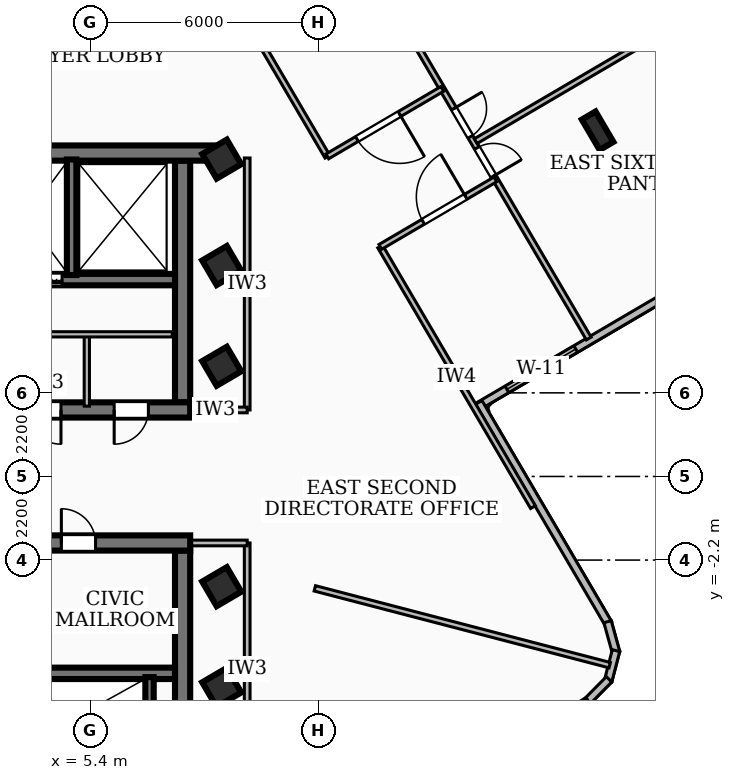
"""IFC4 building model, lengths in metres.
Left out: names, types, materials, properties, quantities, classifications, styles, units other than length and angle.
Written with IfcOpenShell. Run it as: python <this file> out.ifc"""

import sys

from ifc_helpers import new_model, si_unit, direction, frame, frame_2d, origin, origin_2d, place, context, subcontext, project, spatial, rectangle, i_section, extrude, element, fill, save


model = new_model("IFC4")
c1 = context("Model", 3, precision=1e-05, world=origin(), true_north=direction((0.0, 1.0)))
c2 = subcontext(c1, "Body", "Model", "MODEL_VIEW")
j1 = project(units=[si_unit("LENGTHUNIT", "METRE"), si_unit("PLANEANGLEUNIT", "RADIAN")], contexts=[c1])
p1 = place(None, origin())
s1 = spatial("IfcSite", under=j1, at=p1, CompositionType="ELEMENT")
p2 = place(p1, origin())
s2 = spatial("IfcBuilding", under=s1, at=p2, CompositionType="ELEMENT")
p3 = place(p2, frame((0.0, 0.0, 212.04)))
s3 = spatial("IfcBuildingStorey", under=s2, at=p3, CompositionType="ELEMENT", Elevation=212.04)
p4 = place(p3, frame((-8.78, 8.51, 0.0), z_axis=(0.0, 0.0, 1.0), x_axis=(1.0, 0.0, 0.0)))
e1 = element("IfcWall", 1, at=p4, inside=s3, PredefinedType="SHEAR", context=c2, shape_type="SweptSolid", body=[
    extrude(rectangle(XDim=17.56, YDim=0.4, at=frame_2d((8.78, 0.0))), origin(), (0.0, 0.0, 1.0), 3.16),
])
p5 = place(p3, frame((8.02, 1.75, 0.0), z_axis=(0.0, 0.0, 1.0), x_axis=(-1.0, 0.0, 0.0)))
e2 = element("IfcWall", 2, at=p5, inside=s3, PredefinedType="SHEAR", context=c2, shape_type="SweptSolid", body=[
    extrude(rectangle(XDim=16.04, YDim=0.4, at=frame_2d((8.02, 0.0))), origin(), (0.0, 0.0, 1.0), 3.16),
])
p6 = place(p5, frame((7.45, 0.0, 0.0)))
e3 = element("IfcOpeningElement", 3, at=p6, cuts=e2, PredefinedType="OPENING", context=c2, shape_type="SweptSolid", body=[
    extrude(rectangle(XDim=1.0, YDim=2.1, at=frame_2d((0.5, 1.05))), frame((0.0, 0.21, 0.0), z_axis=(0.0, -1.0, 0.0), x_axis=(1.0, 0.0, 0.0)), (0.0, 0.0, 1.0), 0.42),
])
p7 = place(p5, frame((14.285, 0.0, 0.0)))
e4 = element("IfcOpeningElement", 4, at=p7, cuts=e2, PredefinedType="OPENING", context=c2, shape_type="SweptSolid", body=[
    extrude(rectangle(XDim=1.05, YDim=2.15, at=frame_2d((0.525, 1.075))), frame((0.0, 0.21, 0.0), z_axis=(0.0, -1.0, 0.0), x_axis=(1.0, 0.0, 0.0)), (0.0, 0.0, 1.0), 0.42),
])
p8 = place(p5, frame((12.725, 0.0, 0.0)))
e5 = element("IfcOpeningElement", 5, at=p8, cuts=e2, PredefinedType="OPENING", context=c2, shape_type="SweptSolid", body=[
    extrude(rectangle(XDim=1.05, YDim=2.15, at=frame_2d((0.525, 1.075))), frame((0.0, 0.21, 0.0), z_axis=(0.0, -1.0, 0.0), x_axis=(1.0, 0.0, 0.0)), (0.0, 0.0, 1.0), 0.42),
])
p9 = place(p5, frame((11.165, 0.0, 0.0)))
e6 = element("IfcOpeningElement", 6, at=p9, cuts=e2, PredefinedType="OPENING", context=c2, shape_type="SweptSolid", body=[
    extrude(rectangle(XDim=1.05, YDim=2.15, at=frame_2d((0.525, 1.075))), frame((0.0, 0.21, 0.0), z_axis=(0.0, -1.0, 0.0), x_axis=(1.0, 0.0, 0.0)), (0.0, 0.0, 1.0), 0.42),
])
p10 = place(p5, frame((3.4, 0.0, 0.0)))
e7 = element("IfcOpeningElement", 7, at=p10, cuts=e2, PredefinedType="OPENING", context=c2, shape_type="SweptSolid", body=[
    extrude(rectangle(XDim=0.9, YDim=2.06, at=frame_2d((0.45, 1.03))), frame((0.0, 0.21, 0.0), z_axis=(0.0, -1.0, 0.0), x_axis=(1.0, 0.0, 0.0)), (0.0, 0.0, 1.0), 0.42),
])
p11 = place(p5, frame((1.1, 0.0, 0.0)))
e8 = element("IfcOpeningElement", 8, at=p11, cuts=e2, PredefinedType="OPENING", context=c2, shape_type="SweptSolid", body=[
    extrude(rectangle(XDim=0.9, YDim=2.06, at=frame_2d((0.45, 1.03))), frame((0.0, 0.21, 0.0), z_axis=(0.0, -1.0, 0.0), x_axis=(1.0, 0.0, 0.0)), (0.0, 0.0, 1.0), 0.42),
])
p12 = place(p3, frame((7.82, 8.31, 0.0), z_axis=(0.0, 0.0, 1.0), x_axis=(0.0, -1.0, 0.0)))
e9 = element("IfcWall", 9, at=p12, inside=s3, PredefinedType="SHEAR", context=c2, shape_type="SweptSolid", body=[
    extrude(rectangle(XDim=6.36, YDim=0.4, at=frame_2d((3.18, 0.0))), origin(), (0.0, 0.0, 1.0), 3.16),
])
p13 = place(p3, frame((7.62, 5.18, 0.0), z_axis=(0.0, 0.0, 1.0), x_axis=(-1.0, 0.0, 0.0)))
e10 = element("IfcWall", 10, at=p13, inside=s3, PredefinedType="SOLIDWALL", context=c2, shape_type="SweptSolid", body=[
    extrude(rectangle(XDim=15.24, YDim=0.3, at=frame_2d((7.62, 0.0))), origin(), (0.0, 0.0, 1.0), 3.16),
])
p14 = place(p13, frame((5.77, 0.0, 0.0)))
e11 = element("IfcOpeningElement", 11, at=p14, cuts=e10, PredefinedType="OPENING", context=c2, shape_type="SweptSolid", body=[
    extrude(rectangle(XDim=1.1, YDim=2.15, at=frame_2d((0.55, 1.075))), frame((0.0, 0.16, 0.0), z_axis=(0.0, -1.0, 0.0), x_axis=(1.0, 0.0, 0.0)), (0.0, 0.0, 1.0), 0.32),
])
p15 = place(p13, frame((2.97, 0.0, 0.0)))
e12 = element("IfcOpeningElement", 12, at=p15, cuts=e10, PredefinedType="OPENING", context=c2, shape_type="SweptSolid", body=[
    extrude(rectangle(XDim=1.1, YDim=2.15, at=frame_2d((0.55, 1.075))), frame((0.0, 0.16, 0.0), z_axis=(0.0, -1.0, 0.0), x_axis=(1.0, 0.0, 0.0)), (0.0, 0.0, 1.0), 0.32),
])
p16 = place(p13, frame((7.97, 0.0, 0.0)))
e13 = element("IfcOpeningElement", 13, at=p16, cuts=e10, PredefinedType="OPENING", context=c2, shape_type="SweptSolid", body=[
    extrude(rectangle(XDim=1.0, YDim=2.1, at=frame_2d((0.5, 1.05))), frame((0.0, 0.16, 0.0), z_axis=(0.0, -1.0, 0.0), x_axis=(1.0, 0.0, 0.0)), (0.0, 0.0, 1.0), 0.32),
])
p17 = place(p3, frame((-8.02, -1.75, 0.0), z_axis=(0.0, 0.0, 1.0), x_axis=(1.0, 0.0, 0.0)))
e14 = element("IfcWall", 14, at=p17, inside=s3, PredefinedType="SHEAR", context=c2, shape_type="SweptSolid", body=[
    extrude(rectangle(XDim=16.04, YDim=0.4, at=frame_2d((8.02, 0.0))), origin(), (0.0, 0.0, 1.0), 3.16),
])
p18 = place(p17, frame((7.45, 0.0, 0.0)))
e15 = element("IfcOpeningElement", 15, at=p18, cuts=e14, PredefinedType="OPENING", context=c2, shape_type="SweptSolid", body=[
    extrude(rectangle(XDim=1.0, YDim=2.1, at=frame_2d((0.5, 1.05))), frame((0.0, 0.21, 0.0), z_axis=(0.0, -1.0, 0.0), x_axis=(1.0, 0.0, 0.0)), (0.0, 0.0, 1.0), 0.42),
])
p19 = place(p17, frame((12.65, 0.0, 0.0)))
e16 = element("IfcOpeningElement", 16, at=p19, cuts=e14, PredefinedType="OPENING", context=c2, shape_type="SweptSolid", body=[
    extrude(rectangle(XDim=0.9, YDim=2.06, at=frame_2d((0.45, 1.03))), frame((0.0, 0.21, 0.0), z_axis=(0.0, -1.0, 0.0), x_axis=(1.0, 0.0, 0.0)), (0.0, 0.0, 1.0), 0.42),
])
p20 = place(p17, frame((2.25, 0.0, 0.0)))
e17 = element("IfcOpeningElement", 17, at=p20, cuts=e14, PredefinedType="OPENING", context=c2, shape_type="SweptSolid", body=[
    extrude(rectangle(XDim=0.9, YDim=2.06, at=frame_2d((0.45, 1.03))), frame((0.0, 0.21, 0.0), z_axis=(0.0, -1.0, 0.0), x_axis=(1.0, 0.0, 0.0)), (0.0, 0.0, 1.0), 0.42),
])
p21 = place(p3, frame((7.82, -1.95, 0.0), z_axis=(0.0, 0.0, 1.0), x_axis=(0.0, -1.0, 0.0)))
e18 = element("IfcWall", 18, at=p21, inside=s3, PredefinedType="SHEAR", context=c2, shape_type="SweptSolid", body=[
    extrude(rectangle(XDim=6.36, YDim=0.4, at=frame_2d((3.18, 0.0))), origin(), (0.0, 0.0, 1.0), 3.16),
])
p22 = place(p3, frame((-7.62, -5.18, 0.0), z_axis=(0.0, 0.0, 1.0), x_axis=(1.0, 0.0, 0.0)))
e19 = element("IfcWall", 19, at=p22, inside=s3, PredefinedType="SOLIDWALL", context=c2, shape_type="SweptSolid", body=[
    extrude(rectangle(XDim=15.24, YDim=0.3, at=frame_2d((7.62, 0.0))), origin(), (0.0, 0.0, 1.0), 3.16),
])
p23 = place(p22, frame((5.77, 0.0, 0.0)))
e20 = element("IfcOpeningElement", 20, at=p23, cuts=e19, PredefinedType="OPENING", context=c2, shape_type="SweptSolid", body=[
    extrude(rectangle(XDim=1.1, YDim=2.15, at=frame_2d((0.55, 1.075))), frame((0.0, 0.16, 0.0), z_axis=(0.0, -1.0, 0.0), x_axis=(1.0, 0.0, 0.0)), (0.0, 0.0, 1.0), 0.32),
])
p24 = place(p22, frame((7.97, 0.0, 0.0)))
e21 = element("IfcOpeningElement", 21, at=p24, cuts=e19, PredefinedType="OPENING", context=c2, shape_type="SweptSolid", body=[
    extrude(rectangle(XDim=1.0, YDim=2.1, at=frame_2d((0.5, 1.05))), frame((0.0, 0.16, 0.0), z_axis=(0.0, -1.0, 0.0), x_axis=(1.0, 0.0, 0.0)), (0.0, 0.0, 1.0), 0.32),
])
p25 = place(p3, frame((6.95, -8.34, 0.0), z_axis=(0.0, 0.0, 1.0), x_axis=(0.0, 1.0, 0.0)))
e22 = element("IfcWall", 22, at=p25, inside=s3, PredefinedType="SOLIDWALL", context=c2, shape_type="SweptSolid", body=[
    extrude(rectangle(XDim=3.06, YDim=0.22, at=frame_2d((1.53, 0.0))), origin(), (0.0, 0.0, 1.0), 3.16),
])
p26 = place(p3, frame((4.9, 5.3, 0.0), z_axis=(0.0, 0.0, 1.0), x_axis=(0.0, 1.0, 0.0)))
e23 = element("IfcWall", 23, at=p26, inside=s3, PredefinedType="SOLIDWALL", context=c2, shape_type="SweptSolid", body=[
    extrude(rectangle(XDim=3.04, YDim=0.25, at=frame_2d((1.52, 0.0))), origin(), (0.0, 0.0, 1.0), 3.16),
])
for number, where, z_axis, x_axis in (
    (24, (8.85, -5.55, 0.0), (0.0, 0.0, 1.0), (0.863, 0.506, 0.0)),
    (25, (8.85, -2.9, 0.0), (0.0, 0.0, 1.0), (0.863, 0.506, 0.0)),
    (26, (8.85, 2.9, 0.0), (0.0, 0.0, 1.0), (0.863, 0.506, 0.0)),
    (27, (8.85, 5.55, 0.0), (0.0, 0.0, 1.0), (0.863, 0.506, 0.0)),
    (28, (8.85, 8.35, 0.0), (0.0, 0.0, 1.0), (0.863, 0.506, 0.0)),
):
    element("IfcColumn", number, at=place(p3, frame(where, z_axis=z_axis, x_axis=x_axis)), inside=s3, PredefinedType="COLUMN", context=c2, shape_type="SweptSolid", body=[
        extrude(rectangle(XDim=0.75, YDim=0.75, at=origin_2d()), origin(), (0.0, 0.0, 1.0), 3.42),
    ])
p27 = place(p3, frame((18.741, 9.097, 0.0), z_axis=(0.0, 0.0, 1.0), x_axis=(0.862513669207, 0.506033764121, 0.0)))
e29 = element("IfcColumn", 29, at=p27, inside=s3, PredefinedType="COLUMN", context=c2, shape_type="SweptSolid", body=[
    extrude(i_section(OverallWidth=0.418, OverallDepth=0.927, WebThickness=0.019, FlangeThickness=0.032, at=origin_2d()), origin(), (0.0, 0.0, 1.0), 3.42),
])
p28 = place(p3, frame((18.869, 16.65, 0.0), z_axis=(0.0, 0.0, 1.0), x_axis=(0.505984418435, -0.862542618252, 0.0)))
e30 = element("IfcWall", 30, at=p28, inside=s3, PredefinedType="SOLIDWALL", context=c2, shape_type="SweptSolid", body=[
    extrude(rectangle(XDim=9.625, YDim=0.2, at=frame_2d((4.812, 0.0))), origin(), (0.0, 0.0, 1.0), 3.16),
])
p29 = place(p28, frame((6.457, 0.0, 0.85)))
e31 = element("IfcOpeningElement", 31, at=p29, cuts=e30, PredefinedType="OPENING", context=c2, shape_type="SweptSolid", body=[
    extrude(rectangle(XDim=2.1, YDim=1.8, at=frame_2d((1.05, 0.9))), frame((0.0, 0.11, 0.0), z_axis=(0.0, -1.0, 0.0), x_axis=(1.0, 0.0, 0.0)), (0.0, 0.0, 1.0), 0.22),
])
p30 = place(p3, frame((23.209, 6.312, 0.0), z_axis=(0.0, 0.0, 1.0), x_axis=(-0.862602827395, -0.505881766988, 0.0)))
e32 = element("IfcWall", 32, at=p30, inside=s3, PredefinedType="SOLIDWALL", context=c2, shape_type="SweptSolid", body=[
    extrude(rectangle(XDim=8.842, YDim=0.2, at=frame_2d((4.421, 0.0))), origin(), (0.0, 0.0, 1.0), 3.16),
])
p31 = place(p30, frame((5.847, 0.0, 0.85)))
e33 = element("IfcOpeningElement", 33, at=p31, cuts=e32, PredefinedType="OPENING", context=c2, shape_type="SweptSolid", body=[
    extrude(rectangle(XDim=2.1, YDim=1.6, at=frame_2d((1.05, 0.8))), frame((0.0, 0.11, 0.0), z_axis=(0.0, -1.0, 0.0), x_axis=(1.0, 0.0, 0.0)), (0.0, 0.0, 1.0), 0.22),
])
p32 = place(p3, frame((15.611, 1.948, 0.0), z_axis=(0.0, 0.0, 1.0), x_axis=(0.505999167705, -0.862533965872, 0.0)))
e34 = element("IfcWall", 34, at=p32, inside=s3, PredefinedType="SOLIDWALL", context=c2, shape_type="SweptSolid", body=[
    extrude(rectangle(XDim=6.743, YDim=0.2, at=frame_2d((3.372, 0.0))), origin(), (0.0, 0.0, 1.0), 3.16),
])
p33 = place(p3, frame((19.003, -3.822, 0.0), z_axis=(0.0, 0.0, 1.0), x_axis=(0.266246353668, -0.963905015631, 0.0)))
e35 = element("IfcWall", 35, at=p33, inside=s3, PredefinedType="SOLIDWALL", context=c2, shape_type="SweptSolid", body=[
    extrude(rectangle(XDim=0.838, YDim=0.2, at=frame_2d((0.419, 0.0))), origin(), (0.0, 0.0, 1.0), 3.16),
])
p34 = place(p3, frame((19.225, -4.582, 0.0), z_axis=(0.0, 0.0, 1.0), x_axis=(-0.251167733737, -0.967943577658, 0.0)))
e36 = element("IfcWall", 36, at=p34, inside=s3, PredefinedType="SOLIDWALL", context=c2, shape_type="SweptSolid", body=[
    extrude(rectangle(XDim=0.824, YDim=0.2, at=frame_2d((0.412, 0.0))), origin(), (0.0, 0.0, 1.0), 3.16),
])
p35 = place(p3, frame((19.042, -5.338, 0.0), z_axis=(0.0, 0.0, 1.0), x_axis=(-0.702877524881, -0.711310891957, 0.0)))
e37 = element("IfcWall", 37, at=p35, inside=s3, PredefinedType="SOLIDWALL", context=c2, shape_type="SweptSolid", body=[
    extrude(rectangle(XDim=0.84, YDim=0.2, at=frame_2d((0.42, 0.0))), origin(), (0.0, 0.0, 1.0), 3.16),
])
p36 = place(p3, frame((18.492, -5.904, 0.0), z_axis=(0.0, 0.0, 1.0), x_axis=(-0.86245977502, -0.506125613333, 0.0)))
e38 = element("IfcWall", 38, at=p36, inside=s3, PredefinedType="SOLIDWALL", context=c2, shape_type="SweptSolid", body=[
    extrude(rectangle(XDim=6.741, YDim=0.2, at=frame_2d((3.371, 0.0))), origin(), (0.0, 0.0, 1.0), 3.16),
])
p37 = place(p3, frame((2.9, 3.74, 0.0), z_axis=(0.0, 0.0, 1.0), x_axis=(1.0, 0.0, 0.0)))
e39 = element("IfcWall", 39, at=p37, inside=s3, PredefinedType="PARTITIONING", context=c2, shape_type="SweptSolid", body=[
    extrude(rectangle(XDim=4.65, YDim=0.138, at=frame_2d((2.325, 0.0))), origin(), (0.0, 0.0, 1.0), 3.16),
])
p38 = place(p3, frame((5.3, 1.85, 0.0), z_axis=(0.0, 0.0, 1.0), x_axis=(0.0, 1.0, 0.0)))
e40 = element("IfcWall", 40, at=p38, inside=s3, PredefinedType="PARTITIONING", context=c2, shape_type="SweptSolid", body=[
    extrude(rectangle(XDim=1.89, YDim=0.138, at=frame_2d((0.945, 0.0))), origin(), (0.0, 0.0, 1.0), 2.39),
])
p39 = place(p3, frame((9.52, 1.75, 0.0), z_axis=(0.0, 0.0, 1.0), x_axis=(0.0, 1.0, 0.0)))
e41 = element("IfcWall", 41, at=p39, inside=s3, PredefinedType="PARTITIONING", context=c2, shape_type="SweptSolid", body=[
    extrude(rectangle(XDim=6.63, YDim=0.15, at=frame_2d((3.315, 0.0))), origin(), (0.0, 0.0, 1.0), 2.53),
])
p40 = place(p3, frame((7.85, 1.75, 0.0), z_axis=(0.0, 0.0, 1.0), x_axis=(1.0, 0.0, 0.0)))
e42 = element("IfcWall", 42, at=p40, inside=s3, PredefinedType="PARTITIONING", context=c2, shape_type="SweptSolid", body=[
    extrude(rectangle(XDim=1.67, YDim=0.15, at=frame_2d((0.835, 0.0))), origin(), (0.0, 0.0, 1.0), 2.39),
])
p41 = place(p3, frame((9.52, -8.38, 0.0), z_axis=(0.0, 0.0, 1.0), x_axis=(0.0, 1.0, 0.0)))
e43 = element("IfcWall", 43, at=p41, inside=s3, PredefinedType="PARTITIONING", context=c2, shape_type="SweptSolid", body=[
    extrude(rectangle(XDim=6.63, YDim=0.15, at=frame_2d((3.315, 0.0))), origin(), (0.0, 0.0, 1.0), 3.16),
])
p42 = place(p3, frame((7.85, -1.75, 0.0), z_axis=(0.0, 0.0, 1.0), x_axis=(1.0, 0.0, 0.0)))
e44 = element("IfcWall", 44, at=p42, inside=s3, PredefinedType="PARTITIONING", context=c2, shape_type="SweptSolid", body=[
    extrude(rectangle(XDim=1.67, YDim=0.15, at=frame_2d((0.835, 0.0))), origin(), (0.0, 0.0, 1.0), 2.39),
])
p43 = place(p3, frame((11.3, -2.944, 0.0), z_axis=(0.0, 0.0, 1.0), x_axis=(0.967711624716, -0.252059936106, 0.0)))
e45 = element("IfcWall", 45, at=p43, inside=s3, PredefinedType="PARTITIONING", context=c2, shape_type="SweptSolid", body=[
    extrude(rectangle(XDim=8.018, YDim=0.145, at=frame_2d((4.009, 0.0))), origin(), (0.0, 0.0, 1.0), 3.16),
])
p44 = place(p3, frame((11.632, 8.413, 0.0), z_axis=(0.0, 0.0, 1.0), x_axis=(-0.506057561451, 0.862499706955, 0.0)))
e46 = element("IfcWall", 46, at=p44, inside=s3, PredefinedType="PARTITIONING", context=c2, shape_type="SweptSolid", body=[
    extrude(rectangle(XDim=7.95, YDim=0.145, at=frame_2d((3.975, 0.0))), origin(), (0.0, 0.0, 1.0), 2.53),
])
p45 = place(p3, frame((17.041, -0.807, 0.0), z_axis=(0.0, 0.0, 1.0), x_axis=(-0.505943324238, 0.862566723598, 0.0)))
e47 = element("IfcWall", 47, at=p45, inside=s3, PredefinedType="PARTITIONING", context=c2, shape_type="SweptSolid", body=[
    extrude(rectangle(XDim=7.949, YDim=0.145, at=frame_2d((3.975, 0.0))), origin(), (0.0, 0.0, 1.0), 3.16),
])
p46 = place(p3, frame((14.654, 10.198, 0.0), z_axis=(0.0, 0.0, 1.0), x_axis=(-0.862375516706, -0.506269165747, 0.0)))
e48 = element("IfcWall", 48, at=p46, inside=s3, PredefinedType="PARTITIONING", context=c2, shape_type="SweptSolid", body=[
    extrude(rectangle(XDim=3.51, YDim=0.145, at=frame_2d((1.755, 0.0))), origin(), (0.0, 0.0, 1.0), 2.53),
])
p47 = place(p46, frame((1.305, 0.0, 0.0)))
e49 = element("IfcOpeningElement", 49, at=p47, cuts=e48, PredefinedType="OPENING", context=c2, shape_type="SweptSolid", body=[
    extrude(rectangle(XDim=1.3, YDim=2.1, at=frame_2d((0.65, 1.05))), frame((0.0, 0.083, 0.0), z_axis=(0.0, -1.0, 0.0), x_axis=(1.0, 0.0, 0.0)), (0.0, 0.0, 1.0), 0.165),
])
p48 = place(p3, frame((13.024, 6.041, 0.0), z_axis=(0.0, 0.0, 1.0), x_axis=(0.862527334663, 0.506010471195, 0.0)))
e50 = element("IfcWall", 50, at=p48, inside=s3, PredefinedType="PARTITIONING", context=c2, shape_type="SweptSolid", body=[
    extrude(rectangle(XDim=3.51, YDim=0.145, at=frame_2d((1.755, 0.0))), origin(), (0.0, 0.0, 1.0), 3.16),
])
p49 = place(p48, frame((1.305, 0.0, 0.0)))
e51 = element("IfcOpeningElement", 51, at=p49, cuts=e50, PredefinedType="OPENING", context=c2, shape_type="SweptSolid", body=[
    extrude(rectangle(XDim=1.3, YDim=2.1, at=frame_2d((0.65, 1.05))), frame((0.0, 0.083, 0.0), z_axis=(0.0, -1.0, 0.0), x_axis=(1.0, 0.0, 0.0)), (0.0, 0.0, 1.0), 0.165),
])
p50 = place(p3, frame((15.531, 8.822, 0.0), z_axis=(0.0, 0.0, 1.0), x_axis=(0.862494081005, 0.506067149923, 0.0)))
e52 = element("IfcWall", 52, at=p50, inside=s3, PredefinedType="PARTITIONING", context=c2, shape_type="SweptSolid", body=[
    extrude(rectangle(XDim=6.776, YDim=0.145, at=frame_2d((3.388, 0.0))), origin(), (0.0, 0.0, 1.0), 2.53),
])
p51 = place(p3, frame((12.198, 14.385, 0.0), z_axis=(0.0, 0.0, 1.0), x_axis=(0.506037527975, -0.862511460956, 0.0)))
e53 = element("IfcWall", 53, at=p51, inside=s3, PredefinedType="PARTITIONING", context=c2, shape_type="SweptSolid", body=[
    extrude(rectangle(XDim=12.469, YDim=0.145, at=frame_2d((6.235, 0.0))), origin(), (0.0, 0.0, 1.0), 2.53),
])
p52 = place(p51, frame((6.655, 0.0, 0.0)))
e54 = element("IfcOpeningElement", 54, at=p52, cuts=e53, PredefinedType="OPENING", context=c2, shape_type="SweptSolid", body=[
    extrude(rectangle(XDim=0.86, YDim=2.04, at=frame_2d((0.43, 1.02))), frame((0.0, 0.083, 0.0), z_axis=(0.0, -1.0, 0.0), x_axis=(1.0, 0.0, 0.0)), (0.0, 0.0, 1.0), 0.165),
])
p53 = place(p51, frame((5.455, 0.0, 0.0)))
e55 = element("IfcOpeningElement", 55, at=p53, cuts=e53, PredefinedType="OPENING", context=c2, shape_type="SweptSolid", body=[
    extrude(rectangle(XDim=0.86, YDim=2.04, at=frame_2d((0.43, 1.02))), frame((0.0, 0.083, 0.0), z_axis=(0.0, -1.0, 0.0), x_axis=(1.0, 0.0, 0.0)), (0.0, 0.0, 1.0), 0.165),
])
p54 = place(p31, origin())
e56 = element("IfcWindow", 56, at=p54, inside=s3, PartitioningType="SINGLE_PANEL", PredefinedType="WINDOW", context=c2, shape_type="SweptSolid", body=[
    extrude(rectangle(XDim=2.1, YDim=1.6, at=frame_2d((1.05, 0.8))), frame((0.0, 0.03, 0.0), z_axis=(0.0, -1.0, 0.0), x_axis=(1.0, 0.0, 0.0)), (0.0, 0.0, 1.0), 0.06),
])
fill(e33, e56)
p55 = place(p15, origin())
e57 = element("IfcDoor", 57, at=p55, inside=s3, OperationType="DOUBLE_DOOR_SLIDING", PredefinedType="DOOR", context=c2, shape_type="SweptSolid", body=[
    extrude(rectangle(XDim=1.1, YDim=2.15, at=frame_2d((0.55, 1.075))), frame((0.0, 0.025, 0.0), z_axis=(0.0, -1.0, 0.0), x_axis=(1.0, 0.0, 0.0)), (0.0, 0.0, 1.0), 0.05),
])
fill(e12, e57)
p56 = place(p19, origin())
e58 = element("IfcDoor", 58, at=p56, inside=s3, OperationType="SINGLE_SWING_LEFT", PredefinedType="DOOR", context=c2, shape_type="SweptSolid", body=[
    extrude(rectangle(XDim=0.9, YDim=2.06, at=frame_2d((0.45, 1.03))), frame((0.0, 0.025, 0.0), z_axis=(0.0, -1.0, 0.0), x_axis=(1.0, 0.0, 0.0)), (0.0, 0.0, 1.0), 0.05),
])
fill(e16, e58)
p57 = place(p10, origin())
e59 = element("IfcDoor", 59, at=p57, inside=s3, OperationType="SINGLE_SWING_LEFT", PredefinedType="DOOR", context=c2, shape_type="SweptSolid", body=[
    extrude(rectangle(XDim=0.9, YDim=2.06, at=frame_2d((0.45, 1.03))), frame((0.0, 0.025, 0.0), z_axis=(0.0, -1.0, 0.0), x_axis=(1.0, 0.0, 0.0)), (0.0, 0.0, 1.0), 0.05),
])
fill(e7, e59)
p58 = place(p11, origin())
e60 = element("IfcDoor", 60, at=p58, inside=s3, OperationType="SINGLE_SWING_RIGHT", PredefinedType="DOOR", context=c2, shape_type="SweptSolid", body=[
    extrude(rectangle(XDim=0.9, YDim=2.06, at=frame_2d((0.45, 1.03))), frame((0.0, 0.025, 0.0), z_axis=(0.0, -1.0, 0.0), x_axis=(1.0, 0.0, 0.0)), (0.0, 0.0, 1.0), 0.05),
])
fill(e8, e60)
p59 = place(p47, origin())
e61 = element("IfcDoor", 61, at=p59, inside=s3, OperationType="SINGLE_SWING_LEFT", PredefinedType="DOOR", context=c2, shape_type="SweptSolid", body=[
    extrude(rectangle(XDim=1.3, YDim=2.1, at=frame_2d((0.65, 1.05))), frame((0.0, 0.025, 0.0), z_axis=(0.0, -1.0, 0.0), x_axis=(1.0, 0.0, 0.0)), (0.0, 0.0, 1.0), 0.05),
])
fill(e49, e61)
p60 = place(p49, origin())
e62 = element("IfcDoor", 62, at=p60, inside=s3, OperationType="SINGLE_SWING_RIGHT", PredefinedType="DOOR", context=c2, shape_type="SweptSolid", body=[
    extrude(rectangle(XDim=1.3, YDim=2.1, at=frame_2d((0.65, 1.05))), frame((0.0, 0.025, 0.0), z_axis=(0.0, -1.0, 0.0), x_axis=(1.0, 0.0, 0.0)), (0.0, 0.0, 1.0), 0.05),
])
fill(e51, e62)
p61 = place(p52, origin())
e63 = element("IfcDoor", 63, at=p61, inside=s3, OperationType="SINGLE_SWING_RIGHT", PredefinedType="DOOR", context=c2, shape_type="SweptSolid", body=[
    extrude(rectangle(XDim=0.86, YDim=2.04, at=frame_2d((0.43, 1.02))), frame((0.0, 0.025, 0.0), z_axis=(0.0, -1.0, 0.0), x_axis=(1.0, 0.0, 0.0)), (0.0, 0.0, 1.0), 0.05),
])
fill(e54, e63)
p62 = place(p53, origin())
e64 = element("IfcDoor", 64, at=p62, inside=s3, OperationType="SINGLE_SWING_LEFT", PredefinedType="DOOR", context=c2, shape_type="SweptSolid", body=[
    extrude(rectangle(XDim=0.86, YDim=2.04, at=frame_2d((0.43, 1.02))), frame((0.0, 0.025, 0.0), z_axis=(0.0, -1.0, 0.0), x_axis=(1.0, 0.0, 0.0)), (0.0, 0.0, 1.0), 0.05),
])
fill(e55, e64)
save(model, sys.argv[1])
